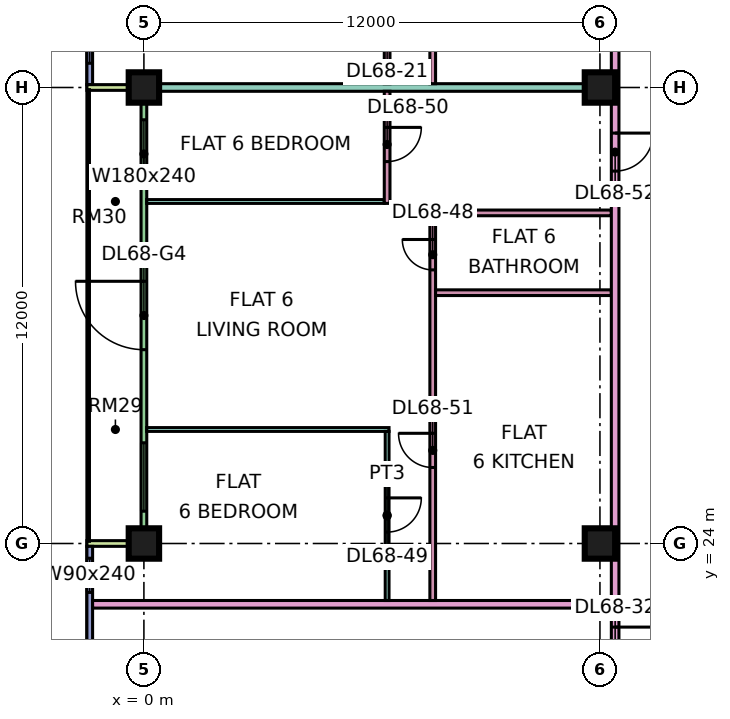
"""IFC4 building model, lengths in metres.
Left out: names, types, materials, properties, quantities, classifications, styles, units other than length and angle.
Written with IfcOpenShell. Run it as: python <this file> out.ifc"""

import sys

from ifc_helpers import new_model, si_unit, direction, frame, frame_2d, origin, origin_2d, place, context, subcontext, project, spatial, rectangle, extrude, element, fill, save


model = new_model("IFC4")
c1 = context("Model", 3, precision=1e-05, world=origin(), true_north=direction((0.0, 1.0)))
c2 = subcontext(c1, "Body", "Model", "MODEL_VIEW")
j1 = project(units=[si_unit("LENGTHUNIT", "METRE"), si_unit("PLANEANGLEUNIT", "RADIAN")], contexts=[c1])
p1 = place(None, origin())
s1 = spatial("IfcSite", under=j1, at=p1, CompositionType="ELEMENT")
p2 = place(p1, origin())
s2 = spatial("IfcBuilding", under=s1, at=p2, CompositionType="ELEMENT")
p3 = place(p2, frame((0.0, 0.0, 292.15)))
s3 = spatial("IfcBuildingStorey", under=s2, at=p3, CompositionType="ELEMENT", Elevation=292.15)
p4 = place(p3, frame((0.0, 24.0, 0.0), z_axis=(0.0, 0.0, 1.0), x_axis=(1.0, 0.0, 0.0)))
e1 = element("IfcColumn", 1, at=p4, inside=s3, PredefinedType="COLUMN", context=c2, shape_type="SweptSolid", body=[
    extrude(rectangle(XDim=0.8, YDim=0.8, at=origin_2d()), origin(), (0.0, 0.0, 1.0), 3.75),
])
p5 = place(p3, frame((0.0, 36.0, 0.0), z_axis=(0.0, 0.0, 1.0), x_axis=(1.0, 0.0, 0.0)))
e2 = element("IfcColumn", 2, at=p5, inside=s3, PredefinedType="COLUMN", context=c2, shape_type="SweptSolid", body=[
    extrude(rectangle(XDim=0.8, YDim=0.8, at=origin_2d()), origin(), (0.0, 0.0, 1.0), 3.75),
])
for number, where, z_axis, x_axis in (
    (3, (12.0, 24.0, 0.0), (0.0, 0.0, 1.0), (1.0, 0.0, 0.0)),
    (4, (12.0, 36.0, 0.0), (0.0, 0.0, 1.0), (1.0, 0.0, 0.0)),
):
    element("IfcColumn", number, at=place(p3, frame(where, z_axis=z_axis, x_axis=x_axis)), inside=s3, PredefinedType="COLUMN", context=c2, shape_type="SweptSolid", body=[
        extrude(rectangle(XDim=0.8, YDim=0.8, at=origin_2d()), origin(), (0.0, 0.0, 1.0), 3.75),
    ])
p6 = place(p3, frame((-1.425, 47.925, 0.0), z_axis=(0.0, 0.0, 1.0), x_axis=(0.0, -1.0, 0.0)))
e5 = element("IfcWall", 5, at=p6, inside=s3, PredefinedType="SOLIDWALL", context=c2, shape_type="SweptSolid", body=[
    extrude(rectangle(XDim=11.85, YDim=0.15, at=frame_2d((5.925, 0.0))), origin(), (0.0, 0.0, 1.0), 3.35),
])
p7 = place(p6, frame((1.462, 0.0, 0.45)))
e6 = element("IfcOpeningElement", 6, at=p7, cuts=e5, PredefinedType="OPENING", context=c2, shape_type="SweptSolid", body=[
    extrude(rectangle(XDim=3.0, YDim=2.4, at=frame_2d((1.5, 1.2))), frame((0.0, 0.085, 0.0), z_axis=(0.0, -1.0, 0.0), x_axis=(1.0, 0.0, 0.0)), (0.0, 0.0, 1.0), 0.17),
])
p8 = place(p6, frame((6.525, 0.0, 0.45)))
e7 = element("IfcOpeningElement", 7, at=p8, cuts=e5, PredefinedType="OPENING", context=c2, shape_type="SweptSolid", body=[
    extrude(rectangle(XDim=1.8, YDim=2.4, at=frame_2d((0.9, 1.2))), frame((0.0, 0.085, 0.0), z_axis=(0.0, -1.0, 0.0), x_axis=(1.0, 0.0, 0.0)), (0.0, 0.0, 1.0), 0.17),
])
p9 = place(p6, frame((9.488, 0.0, 0.45)))
e8 = element("IfcOpeningElement", 8, at=p9, cuts=e5, PredefinedType="OPENING", context=c2, shape_type="SweptSolid", body=[
    extrude(rectangle(XDim=1.8, YDim=2.4, at=frame_2d((0.9, 1.2))), frame((0.0, 0.085, 0.0), z_axis=(0.0, -1.0, 0.0), x_axis=(1.0, 0.0, 0.0)), (0.0, 0.0, 1.0), 0.17),
])
p10 = place(p3, frame((0.0, 35.925, 0.0), z_axis=(0.0, 0.0, 1.0), x_axis=(0.0, -1.0, 0.0)))
e9 = element("IfcWall", 9, at=p10, inside=s3, PredefinedType="SOLIDWALL", context=c2, shape_type="SweptSolid", body=[
    extrude(rectangle(XDim=11.85, YDim=0.15, at=frame_2d((5.925, 0.0))), origin(), (0.0, 0.0, 1.0), 3.35),
])
p11 = place(p10, frame((0.775, 0.0, 0.45)))
e10 = element("IfcOpeningElement", 10, at=p11, cuts=e9, PredefinedType="OPENING", context=c2, shape_type="SweptSolid", body=[
    extrude(rectangle(XDim=1.8, YDim=2.4, at=frame_2d((0.9, 1.2))), frame((0.0, 0.085, 0.0), z_axis=(0.0, -1.0, 0.0), x_axis=(1.0, 0.0, 0.0)), (0.0, 0.0, 1.0), 0.17),
])
p12 = place(p10, frame((5.025, 0.0, 0.0)))
e11 = element("IfcOpeningElement", 11, at=p12, cuts=e9, PredefinedType="OPENING", context=c2, shape_type="SweptSolid", body=[
    extrude(rectangle(XDim=1.8, YDim=2.4, at=frame_2d((0.9, 1.2))), frame((0.0, 0.085, 0.0), z_axis=(0.0, -1.0, 0.0), x_axis=(1.0, 0.0, 0.0)), (0.0, 0.0, 1.0), 0.17),
])
p13 = place(p10, frame((9.275, 0.0, 0.45)))
e12 = element("IfcOpeningElement", 12, at=p13, cuts=e9, PredefinedType="OPENING", context=c2, shape_type="SweptSolid", body=[
    extrude(rectangle(XDim=1.8, YDim=2.4, at=frame_2d((0.9, 1.2))), frame((0.0, 0.085, 0.0), z_axis=(0.0, -1.0, 0.0), x_axis=(1.0, 0.0, 0.0)), (0.0, 0.0, 1.0), 0.17),
])
for number, where, z_axis, x_axis in (
    (13, (-1.5, 36.0, 0.0), (0.0, 0.0, 1.0), (1.0, 0.0, 0.0)),
    (14, (-1.5, 24.0, 0.0), (0.0, 0.0, 1.0), (1.0, 0.0, 0.0)),
):
    element("IfcWall", number, at=place(p3, frame(where, z_axis=z_axis, x_axis=x_axis)), inside=s3, PredefinedType="SOLIDWALL", context=c2, shape_type="SweptSolid", body=[
        extrude(rectangle(XDim=1.5, YDim=0.15, at=frame_2d((0.75, 0.0))), origin(), (0.0, 0.0, 1.0), 3.35),
    ])
p14 = place(p3, frame((-1.425, 23.925, 0.0), z_axis=(0.0, 0.0, 1.0), x_axis=(0.0, -1.0, 0.0)))
e15 = element("IfcWall", 15, at=p14, inside=s3, PredefinedType="SOLIDWALL", context=c2, shape_type="SweptSolid", body=[
    extrude(rectangle(XDim=11.425, YDim=0.15, at=frame_2d((5.712, 0.0))), origin(), (0.0, 0.0, 1.0), 3.35),
])
p15 = place(p14, frame((0.312, 0.0, 0.45)))
e16 = element("IfcOpeningElement", 16, at=p15, cuts=e15, PredefinedType="OPENING", context=c2, shape_type="SweptSolid", body=[
    extrude(rectangle(XDim=0.9, YDim=2.4, at=frame_2d((0.45, 1.2))), frame((0.0, 0.085, 0.0), z_axis=(0.0, -1.0, 0.0), x_axis=(1.0, 0.0, 0.0)), (0.0, 0.0, 1.0), 0.17),
])
p16 = place(p14, frame((6.175, 0.0, 0.45)))
e17 = element("IfcOpeningElement", 17, at=p16, cuts=e15, PredefinedType="OPENING", context=c2, shape_type="SweptSolid", body=[
    extrude(rectangle(XDim=3.0, YDim=2.4, at=frame_2d((1.5, 1.2))), frame((0.0, 0.085, 0.0), z_axis=(0.0, -1.0, 0.0), x_axis=(1.0, 0.0, 0.0)), (0.0, 0.0, 1.0), 0.17),
])
p17 = place(p3, frame((-1.35, 22.4, 0.0), z_axis=(0.0, 0.0, 1.0), x_axis=(1.0, 0.0, 0.0)))
e18 = element("IfcWall", 18, at=p17, inside=s3, PredefinedType="PARTITIONING", context=c2, shape_type="SweptSolid", body=[
    extrude(rectangle(XDim=13.65, YDim=0.2, at=frame_2d((6.825, 0.0))), origin(), (0.0, 0.0, 1.0), 3.35),
])
e19 = element("IfcWall", 19, at=p5, inside=s3, PredefinedType="PARTITIONING", context=c2, shape_type="SweptSolid", body=[
    extrude(rectangle(XDim=12.3, YDim=0.2, at=frame_2d((6.15, 0.0))), origin(), (0.0, 0.0, 1.0), 3.35),
])
p18 = place(p3, frame((0.074, 27.0, 0.0), z_axis=(0.0, 0.0, 1.0), x_axis=(1.0, 0.0, 0.0)))
e20 = element("IfcWall", 20, at=p18, inside=s3, PredefinedType="PARTITIONING", context=c2, shape_type="SweptSolid", body=[
    extrude(rectangle(XDim=6.376, YDim=0.1, at=frame_2d((3.188, 0.0))), origin(), (0.0, 0.0, 1.0), 3.35),
])
p19 = place(p3, frame((0.074, 33.0, 0.0), z_axis=(0.0, 0.0, 1.0), x_axis=(1.0, 0.0, 0.0)))
e21 = element("IfcWall", 21, at=p19, inside=s3, PredefinedType="PARTITIONING", context=c2, shape_type="SweptSolid", body=[
    extrude(rectangle(XDim=6.251, YDim=0.1, at=frame_2d((3.125, 0.0))), origin(), (0.0, 0.0, 1.0), 3.35),
])
p20 = place(p3, frame((6.4, 22.5, 0.0), z_axis=(0.0, 0.0, 1.0), x_axis=(0.0, 1.0, 0.0)))
e22 = element("IfcWall", 22, at=p20, inside=s3, PredefinedType="PARTITIONING", context=c2, shape_type="SweptSolid", body=[
    extrude(rectangle(XDim=4.45, YDim=0.1, at=frame_2d((2.225, 0.0))), origin(), (0.0, 0.0, 1.0), 3.35),
])
p21 = place(p20, frame((1.8, 0.0, 0.0)))
e23 = element("IfcOpeningElement", 23, at=p21, cuts=e22, PredefinedType="OPENING", context=c2, shape_type="SweptSolid", body=[
    extrude(rectangle(XDim=0.9, YDim=2.1, at=frame_2d((0.45, 1.05))), frame((0.0, 0.06, 0.0), z_axis=(0.0, -1.0, 0.0), x_axis=(1.0, 0.0, 0.0)), (0.0, 0.0, 1.0), 0.12),
])
p22 = place(p3, frame((6.4, 32.95, 0.0), z_axis=(0.0, 0.0, 1.0), x_axis=(0.0, 1.0, 0.0)))
e24 = element("IfcWall", 24, at=p22, inside=s3, PredefinedType="PARTITIONING", context=c2, shape_type="SweptSolid", body=[
    extrude(rectangle(XDim=2.95, YDim=0.15, at=frame_2d((1.475, 0.0))), origin(), (0.0, 0.0, 1.0), 3.35),
])
p23 = place(p22, frame((1.1, 0.0, 0.0)))
e25 = element("IfcOpeningElement", 25, at=p23, cuts=e24, PredefinedType="OPENING", context=c2, shape_type="SweptSolid", body=[
    extrude(rectangle(XDim=0.9, YDim=2.1, at=frame_2d((0.45, 1.05))), frame((0.0, 0.085, 0.0), z_axis=(0.0, -1.0, 0.0), x_axis=(1.0, 0.0, 0.0)), (0.0, 0.0, 1.0), 0.17),
])
p24 = place(p3, frame((6.4, 36.1, 0.0), z_axis=(0.0, 0.0, 1.0), x_axis=(0.0, 1.0, 0.0)))
e26 = element("IfcWall", 26, at=p24, inside=s3, PredefinedType="PARTITIONING", context=c2, shape_type="SweptSolid", body=[
    extrude(rectangle(XDim=11.95, YDim=0.15, at=frame_2d((5.975, 0.0))), origin(), (0.0, 0.0, 1.0), 3.35),
])
p25 = place(p24, frame((0.95, 0.0, 0.0)))
e27 = element("IfcOpeningElement", 27, at=p25, cuts=e26, PredefinedType="OPENING", context=c2, shape_type="SweptSolid", body=[
    extrude(rectangle(XDim=0.9, YDim=2.1, at=frame_2d((0.45, 1.05))), frame((0.0, 0.085, 0.0), z_axis=(0.0, -1.0, 0.0), x_axis=(1.0, 0.0, 0.0)), (0.0, 0.0, 1.0), 0.17),
])
p26 = place(p24, frame((4.8, 0.0, 0.0)))
e28 = element("IfcOpeningElement", 28, at=p26, cuts=e26, PredefinedType="OPENING", context=c2, shape_type="SweptSolid", body=[
    extrude(rectangle(XDim=0.8, YDim=2.1, at=frame_2d((0.4, 1.05))), frame((0.0, 0.085, 0.0), z_axis=(0.0, -1.0, 0.0), x_axis=(1.0, 0.0, 0.0)), (0.0, 0.0, 1.0), 0.17),
])
p27 = place(p3, frame((7.6, 22.5, 0.0), z_axis=(0.0, 0.0, 1.0), x_axis=(0.0, 1.0, 0.0)))
e29 = element("IfcWall", 29, at=p27, inside=s3, PredefinedType="PARTITIONING", context=c2, shape_type="SweptSolid", body=[
    extrude(rectangle(XDim=10.275, YDim=0.15, at=frame_2d((5.137, 0.0))), origin(), (0.0, 0.0, 1.0), 3.35),
])
p28 = place(p27, frame((8.7, 0.0, 0.0)))
e30 = element("IfcOpeningElement", 30, at=p28, cuts=e29, PredefinedType="OPENING", context=c2, shape_type="SweptSolid", body=[
    extrude(rectangle(XDim=0.8, YDim=2.1, at=frame_2d((0.4, 1.05))), frame((0.0, 0.085, 0.0), z_axis=(0.0, -1.0, 0.0), x_axis=(1.0, 0.0, 0.0)), (0.0, 0.0, 1.0), 0.17),
])
p29 = place(p27, frame((3.5, 0.0, 0.0)))
e31 = element("IfcOpeningElement", 31, at=p29, cuts=e29, PredefinedType="OPENING", context=c2, shape_type="SweptSolid", body=[
    extrude(rectangle(XDim=0.9, YDim=2.1, at=frame_2d((0.45, 1.05))), frame((0.0, 0.085, 0.0), z_axis=(0.0, -1.0, 0.0), x_axis=(1.0, 0.0, 0.0)), (0.0, 0.0, 1.0), 0.17),
])
p30 = place(p3, frame((7.6, 36.1, 0.0), z_axis=(0.0, 0.0, 1.0), x_axis=(0.0, 1.0, 0.0)))
e32 = element("IfcWall", 32, at=p30, inside=s3, PredefinedType="PARTITIONING", context=c2, shape_type="SweptSolid", body=[
    extrude(rectangle(XDim=14.975, YDim=0.15, at=frame_2d((7.487, 0.0))), origin(), (0.0, 0.0, 1.0), 3.35),
])
p31 = place(p30, frame((9.5, 0.0, 0.0)))
e33 = element("IfcOpeningElement", 33, at=p31, cuts=e32, PredefinedType="OPENING", context=c2, shape_type="SweptSolid", body=[
    extrude(rectangle(XDim=0.8, YDim=2.1, at=frame_2d((0.4, 1.05))), frame((0.0, 0.085, 0.0), z_axis=(0.0, -1.0, 0.0), x_axis=(1.0, 0.0, 0.0)), (0.0, 0.0, 1.0), 0.17),
])
p32 = place(p30, frame((2.75, 0.0, 0.0)))
e34 = element("IfcOpeningElement", 34, at=p32, cuts=e32, PredefinedType="OPENING", context=c2, shape_type="SweptSolid", body=[
    extrude(rectangle(XDim=0.9, YDim=2.1, at=frame_2d((0.45, 1.05))), frame((0.0, 0.085, 0.0), z_axis=(0.0, -1.0, 0.0), x_axis=(1.0, 0.0, 0.0)), (0.0, 0.0, 1.0), 0.17),
])
p33 = place(p30, frame((7.1, 0.0, 0.0)))
e35 = element("IfcOpeningElement", 35, at=p33, cuts=e32, PredefinedType="OPENING", context=c2, shape_type="SweptSolid", body=[
    extrude(rectangle(XDim=0.9, YDim=2.1, at=frame_2d((0.45, 1.05))), frame((0.0, 0.085, 0.0), z_axis=(0.0, -1.0, 0.0), x_axis=(1.0, 0.0, 0.0)), (0.0, 0.0, 1.0), 0.17),
])
for number, where, z_axis, x_axis in (
    (36, (7.675, 30.6, 0.0), (0.0, 0.0, 1.0), (1.0, 0.0, 0.0)),
    (37, (7.675, 32.7, 0.0), (0.0, 0.0, 1.0), (1.0, 0.0, 0.0)),
):
    element("IfcWall", number, at=place(p3, frame(where, z_axis=z_axis, x_axis=x_axis)), inside=s3, PredefinedType="PARTITIONING", context=c2, shape_type="SweptSolid", body=[
        extrude(rectangle(XDim=4.625, YDim=0.15, at=frame_2d((2.312, 0.0))), origin(), (0.0, 0.0, 1.0), 3.35),
    ])
p34 = place(p3, frame((12.4, 20.0, 0.0), z_axis=(0.0, 0.0, 1.0), x_axis=(0.0, 1.0, 0.0)))
e38 = element("IfcWall", 38, at=p34, inside=s3, PredefinedType="PARTITIONING", context=c2, shape_type="SweptSolid", body=[
    extrude(rectangle(XDim=34.0, YDim=0.2, at=frame_2d((17.0, 0.0))), origin(), (0.0, 0.0, 1.0), 3.35),
])
p35 = place(p34, frame((31.95, 0.0, 0.0)))
e39 = element("IfcOpeningElement", 39, at=p35, cuts=e38, PredefinedType="OPENING", context=c2, shape_type="SweptSolid", body=[
    extrude(rectangle(XDim=1.0, YDim=2.1, at=frame_2d((0.5, 1.05))), frame((0.0, 0.11, 0.0), z_axis=(0.0, -1.0, 0.0), x_axis=(1.0, 0.0, 0.0)), (0.0, 0.0, 1.0), 0.22),
])
p36 = place(p34, frame((0.6, 0.0, 0.0)))
e40 = element("IfcOpeningElement", 40, at=p36, cuts=e38, PredefinedType="OPENING", context=c2, shape_type="SweptSolid", body=[
    extrude(rectangle(XDim=1.2, YDim=2.1, at=frame_2d((0.6, 1.05))), frame((0.0, 0.11, 0.0), z_axis=(0.0, -1.0, 0.0), x_axis=(1.0, 0.0, 0.0)), (0.0, 0.0, 1.0), 0.22),
])
p37 = place(p34, frame((13.8, 0.0, 0.0)))
e41 = element("IfcOpeningElement", 41, at=p37, cuts=e38, PredefinedType="OPENING", context=c2, shape_type="SweptSolid", body=[
    extrude(rectangle(XDim=1.0, YDim=2.1, at=frame_2d((0.5, 1.05))), frame((0.0, 0.11, 0.0), z_axis=(0.0, -1.0, 0.0), x_axis=(1.0, 0.0, 0.0)), (0.0, 0.0, 1.0), 0.22),
])
p38 = place(p9, origin())
e42 = element("IfcWindow", 42, at=p38, inside=s3, PartitioningType="SINGLE_PANEL", PredefinedType="WINDOW", context=c2, shape_type="SweptSolid", body=[
    extrude(rectangle(XDim=1.8, YDim=2.4, at=frame_2d((0.9, 1.2))), frame((0.0, 0.03, 0.0), z_axis=(0.0, -1.0, 0.0), x_axis=(1.0, 0.0, 0.0)), (0.0, 0.0, 1.0), 0.06),
])
fill(e8, e42)
p39 = place(p11, origin())
e43 = element("IfcWindow", 43, at=p39, inside=s3, PartitioningType="SINGLE_PANEL", PredefinedType="WINDOW", context=c2, shape_type="SweptSolid", body=[
    extrude(rectangle(XDim=1.8, YDim=2.4, at=frame_2d((0.9, 1.2))), frame((0.0, 0.03, 0.0), z_axis=(0.0, -1.0, 0.0), x_axis=(1.0, 0.0, 0.0)), (0.0, 0.0, 1.0), 0.06),
])
fill(e10, e43)
p40 = place(p12, frame((1.8, 0.0, 0.0), z_axis=(0.0, 0.0, 1.0), x_axis=(-1.0, 0.0, 0.0)))
e44 = element("IfcDoor", 44, at=p40, inside=s3, OperationType="DOUBLE_DOOR_SINGLE_SWING", PredefinedType="DOOR", context=c2, shape_type="SweptSolid", body=[
    extrude(rectangle(XDim=1.8, YDim=2.4, at=frame_2d((0.9, 1.2))), frame((0.0, 0.025, 0.0), z_axis=(0.0, -1.0, 0.0), x_axis=(1.0, 0.0, 0.0)), (0.0, 0.0, 1.0), 0.05),
])
fill(e11, e44)
p41 = place(p13, origin())
e45 = element("IfcWindow", 45, at=p41, inside=s3, PartitioningType="SINGLE_PANEL", PredefinedType="WINDOW", context=c2, shape_type="SweptSolid", body=[
    extrude(rectangle(XDim=1.8, YDim=2.4, at=frame_2d((0.9, 1.2))), frame((0.0, 0.03, 0.0), z_axis=(0.0, -1.0, 0.0), x_axis=(1.0, 0.0, 0.0)), (0.0, 0.0, 1.0), 0.06),
])
fill(e12, e45)
p42 = place(p15, origin())
e46 = element("IfcWindow", 46, at=p42, inside=s3, PartitioningType="SINGLE_PANEL", PredefinedType="WINDOW", context=c2, shape_type="SweptSolid", body=[
    extrude(rectangle(XDim=0.9, YDim=2.4, at=frame_2d((0.45, 1.2))), frame((0.0, 0.03, 0.0), z_axis=(0.0, -1.0, 0.0), x_axis=(1.0, 0.0, 0.0)), (0.0, 0.0, 1.0), 0.06),
])
fill(e16, e46)
p43 = place(p36, origin())
e47 = element("IfcDoor", 47, at=p43, inside=s3, OperationType="SINGLE_SWING_RIGHT", PredefinedType="DOOR", context=c2, shape_type="SweptSolid", body=[
    extrude(rectangle(XDim=1.2, YDim=2.1, at=frame_2d((0.6, 1.05))), frame((0.0, 0.025, 0.0), z_axis=(0.0, -1.0, 0.0), x_axis=(1.0, 0.0, 0.0)), (0.0, 0.0, 1.0), 0.05),
])
fill(e40, e47)
p44 = place(p28, frame((0.8, 0.0, 0.0), z_axis=(0.0, 0.0, 1.0), x_axis=(-1.0, 0.0, 0.0)))
e48 = element("IfcDoor", 48, at=p44, inside=s3, OperationType="SINGLE_SWING_RIGHT", PredefinedType="DOOR", context=c2, shape_type="SweptSolid", body=[
    extrude(rectangle(XDim=0.8, YDim=2.1, at=frame_2d((0.4, 1.05))), frame((0.0, 0.025, 0.0), z_axis=(0.0, -1.0, 0.0), x_axis=(1.0, 0.0, 0.0)), (0.0, 0.0, 1.0), 0.05),
])
fill(e30, e48)
p45 = place(p21, origin())
e49 = element("IfcDoor", 49, at=p45, inside=s3, OperationType="SINGLE_SWING_RIGHT", PredefinedType="DOOR", context=c2, shape_type="SweptSolid", body=[
    extrude(rectangle(XDim=0.9, YDim=2.1, at=frame_2d((0.45, 1.05))), frame((0.0, 0.025, 0.0), z_axis=(0.0, -1.0, 0.0), x_axis=(1.0, 0.0, 0.0)), (0.0, 0.0, 1.0), 0.05),
])
fill(e23, e49)
p46 = place(p23, origin())
e50 = element("IfcDoor", 50, at=p46, inside=s3, OperationType="SINGLE_SWING_RIGHT", PredefinedType="DOOR", context=c2, shape_type="SweptSolid", body=[
    extrude(rectangle(XDim=0.9, YDim=2.1, at=frame_2d((0.45, 1.05))), frame((0.0, 0.025, 0.0), z_axis=(0.0, -1.0, 0.0), x_axis=(1.0, 0.0, 0.0)), (0.0, 0.0, 1.0), 0.05),
])
fill(e25, e50)
p47 = place(p29, frame((0.9, 0.0, 0.0), z_axis=(0.0, 0.0, 1.0), x_axis=(-1.0, 0.0, 0.0)))
e51 = element("IfcDoor", 51, at=p47, inside=s3, OperationType="SINGLE_SWING_RIGHT", PredefinedType="DOOR", context=c2, shape_type="SweptSolid", body=[
    extrude(rectangle(XDim=0.9, YDim=2.1, at=frame_2d((0.45, 1.05))), frame((0.0, 0.025, 0.0), z_axis=(0.0, -1.0, 0.0), x_axis=(1.0, 0.0, 0.0)), (0.0, 0.0, 1.0), 0.05),
])
fill(e31, e51)
p48 = place(p37, origin())
e52 = element("IfcDoor", 52, at=p48, inside=s3, OperationType="SINGLE_SWING_RIGHT", PredefinedType="DOOR", context=c2, shape_type="SweptSolid", body=[
    extrude(rectangle(XDim=1.0, YDim=2.1, at=frame_2d((0.5, 1.05))), frame((0.0, 0.025, 0.0), z_axis=(0.0, -1.0, 0.0), x_axis=(1.0, 0.0, 0.0)), (0.0, 0.0, 1.0), 0.05),
])
fill(e41, e52)
save(model, sys.argv[1])
